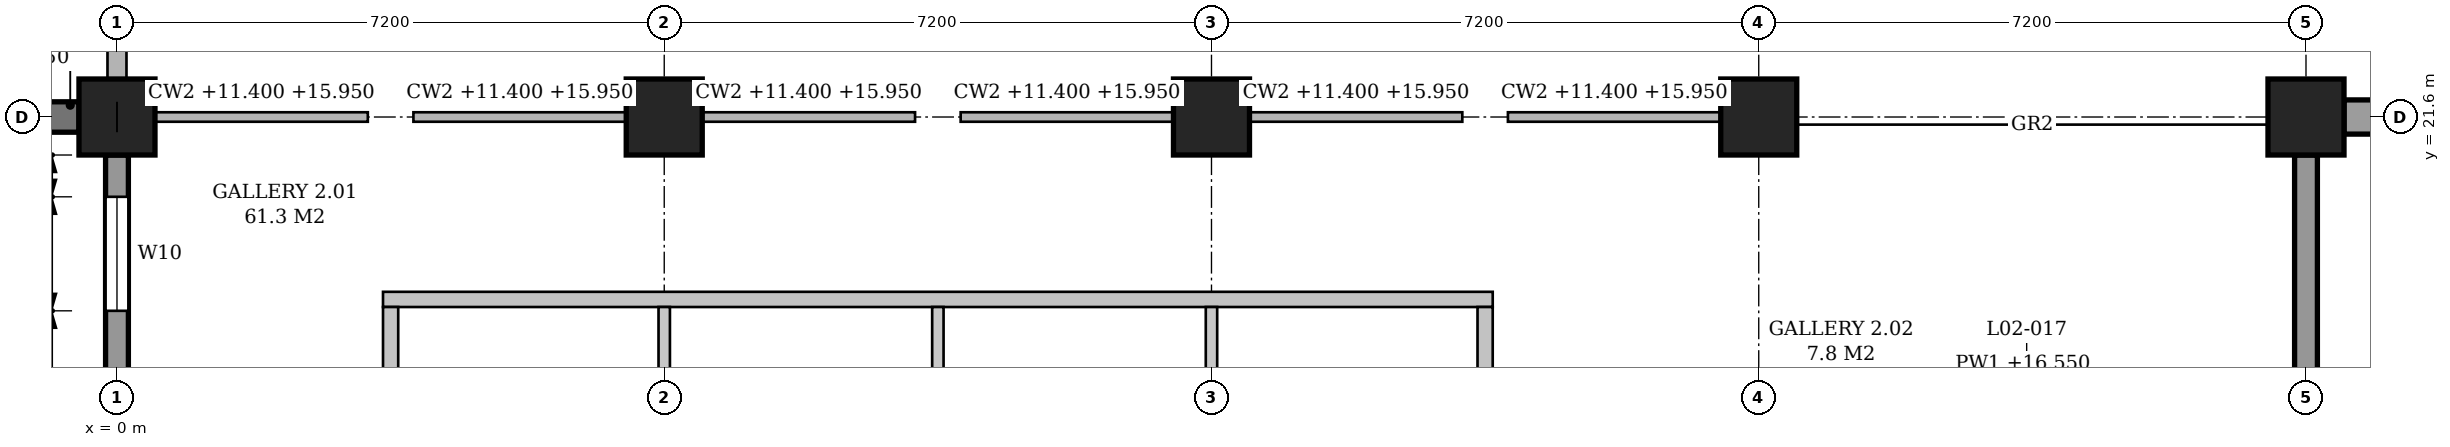
"""IFC4 building model, lengths in metres.
Left out: names, types, materials, properties, quantities, classifications, styles, units other than length and angle.
Written with IfcOpenShell. Run it as: python <this file> out.ifc"""

import sys

from ifc_helpers import new_model, si_unit, direction, frame, frame_2d, origin, origin_2d, place, context, subcontext, project, spatial, polyline, rectangle, outline, extrude, element, fill, save


model = new_model("IFC4")
c1 = context("Model", 3, precision=1e-05, world=origin(), true_north=direction((0.0, 1.0)))
c2 = subcontext(c1, "Body", "Model", "MODEL_VIEW")
j1 = project(units=[si_unit("LENGTHUNIT", "METRE"), si_unit("PLANEANGLEUNIT", "RADIAN")], contexts=[c1])
p1 = place(None, origin())
s1 = spatial("IfcSite", under=j1, at=p1, CompositionType="ELEMENT")
p2 = place(p1, origin())
s2 = spatial("IfcBuilding", under=s1, at=p2, CompositionType="ELEMENT")
p3 = place(p2, frame((0.0, 0.0, 11.4)))
s3 = spatial("IfcBuildingStorey", under=s2, at=p3, CompositionType="ELEMENT", Elevation=11.4)
for number, where, z_axis, x_axis in (
    (1, (0.0, 21.6, 0.0), (0.0, 0.0, 1.0), (1.0, 0.0, 0.0)),
    (2, (7.2, 21.6, 0.0), (0.0, 0.0, 1.0), (1.0, 0.0, 0.0)),
    (3, (14.4, 21.6, 0.0), (0.0, 0.0, 1.0), (1.0, 0.0, 0.0)),
    (4, (21.6, 21.6, 0.0), (0.0, 0.0, 1.0), (1.0, 0.0, 0.0)),
    (5, (28.8, 21.6, 0.0), (0.0, 0.0, 1.0), (1.0, 0.0, 0.0)),
):
    element("IfcColumn", number, at=place(p3, frame(where, z_axis=z_axis, x_axis=x_axis)), inside=s3, PredefinedType="COLUMN", context=c2, shape_type="SweptSolid", body=[
        extrude(rectangle(XDim=1.0, YDim=1.0, at=origin_2d()), origin(), (0.0, 0.0, 1.0), 5.4),
    ])
p4 = place(p3, frame((0.0, 14.9, 0.0), z_axis=(0.0, 0.0, 1.0), x_axis=(0.0, 1.0, 0.0)))
e6 = element("IfcWall", 6, at=p4, inside=s3, PredefinedType="STANDARD", context=c2, shape_type="SweptSolid", body=[
    extrude(rectangle(XDim=6.2, YDim=0.3, at=frame_2d((3.1, 0.0))), origin(), (0.0, 0.0, 1.0), 4.55),
])
p5 = place(p4, frame((0.55, 0.0, 0.9)))
e7 = element("IfcOpeningElement", 7, at=p5, cuts=e6, PredefinedType="OPENING", context=c2, shape_type="SweptSolid", body=[
    extrude(outline(polyline([(0.0, 0.0), (1.5, 0.0), (1.5, 2.35), (0.75, 3.1), (0.0, 2.35), (0.0, 0.0)])), frame((0.0, 0.16, 0.0), z_axis=(0.0, -1.0, 0.0), x_axis=(1.0, 0.0, 0.0)), (0.0, 0.0, 1.0), 0.32),
])
p6 = place(p4, frame((4.15, 0.0, 0.9)))
e8 = element("IfcOpeningElement", 8, at=p6, cuts=e6, PredefinedType="OPENING", context=c2, shape_type="SweptSolid", body=[
    extrude(outline(polyline([(0.0, 0.0), (1.5, 0.0), (1.5, 2.35), (0.75, 3.1), (0.0, 2.35), (0.0, 0.0)])), frame((0.0, 0.16, 0.0), z_axis=(0.0, -1.0, 0.0), x_axis=(1.0, 0.0, 0.0)), (0.0, 0.0, 1.0), 0.32),
])
p7 = place(p3, frame((28.8, 14.9, 0.0), z_axis=(0.0, 0.0, 1.0), x_axis=(0.0, 1.0, 0.0)))
e9 = element("IfcWall", 9, at=p7, inside=s3, PredefinedType="STANDARD", context=c2, shape_type="SweptSolid", body=[
    extrude(rectangle(XDim=6.2, YDim=0.3, at=frame_2d((3.1, 0.0))), origin(), (0.0, 0.0, 1.0), 4.55),
])
p8 = place(p3, frame((29.3, 21.6, 0.0), z_axis=(0.0, 0.0, 1.0), x_axis=(1.0, 0.0, 0.0)))
e10 = element("IfcWall", 10, at=p8, inside=s3, PredefinedType="STANDARD", context=c2, shape_type="SweptSolid", body=[
    extrude(rectangle(XDim=6.275, YDim=0.45, at=frame_2d((3.137, 0.0))), origin(), (0.0, 0.0, 1.0), 4.1),
])
p9 = place(p3, frame((-0.5, 21.6, 0.0), z_axis=(0.0, 0.0, 1.0), x_axis=(-1.0, 0.0, 0.0)))
e11 = element("IfcWall", 11, at=p9, inside=s3, PredefinedType="POLYGONAL", context=c2, shape_type="SweptSolid", body=[
    extrude(outline(polyline([(0.6, 0.0), (0.6, 9.95), (0.0, 9.95), (0.0, 0.0), (0.6, 0.0)])), frame((0.0, 0.2, 0.0), z_axis=(0.0, -1.0, 0.0), x_axis=(1.0, 0.0, 0.0)), (0.0, 0.0, 1.0), 0.4),
])
p10 = place(p3, frame((3.5, 19.2, 0.0), z_axis=(0.0, 0.0, 1.0), x_axis=(1.0, 0.0, 0.0)))
e12 = element("IfcWall", 12, at=p10, inside=s3, PredefinedType="PARTITIONING", context=c2, shape_type="SweptSolid", body=[
    extrude(outline(polyline([(0.0, 0.0), (14.6, 0.0), (14.6, 5.15), (11.15, 5.15), (11.15, 4.4), (10.65, 4.4), (10.65, 5.15), (3.95, 5.15), (3.95, 4.4), (3.45, 4.4), (3.45, 5.15), (0.0, 5.15), (0.0, 0.0)])), frame((0.0, 0.1, 0.0), z_axis=(0.0, -1.0, 0.0), x_axis=(1.0, 0.0, 0.0)), (0.0, 0.0, 1.0), 0.2),
])
p11 = place(p3, frame((3.6, 9.7, 0.0), z_axis=(0.0, 0.0, 1.0), x_axis=(0.0, 1.0, 0.0)))
e13 = element("IfcWall", 13, at=p11, inside=s3, PredefinedType="PARTITIONING", context=c2, shape_type="SweptSolid", body=[
    extrude(outline(polyline([(0.0, 0.0), (9.4, 0.0), (9.4, 5.15), (4.95, 5.15), (4.95, 4.4), (4.45, 4.4), (4.45, 5.15), (0.0, 5.15), (0.0, 0.0)])), frame((0.0, 0.1, 0.0), z_axis=(0.0, -1.0, 0.0), x_axis=(1.0, 0.0, 0.0)), (0.0, 0.0, 1.0), 0.2),
])
p12 = place(p11, frame((4.2, 0.0, 0.0)))
e14 = element("IfcOpeningElement", 14, at=p12, cuts=e13, PredefinedType="OPENING", context=c2, shape_type="SweptSolid", body=[
    extrude(rectangle(XDim=1.0, YDim=2.1, at=frame_2d((0.5, 1.05))), frame((0.0, 0.11, 0.0), z_axis=(0.0, -1.0, 0.0), x_axis=(1.0, 0.0, 0.0)), (0.0, 0.0, 1.0), 0.22),
])
p13 = place(p3, frame((7.2, 14.9, 0.0), z_axis=(0.0, 0.0, 1.0), x_axis=(0.0, 1.0, 0.0)))
e15 = element("IfcWall", 15, at=p13, inside=s3, PredefinedType="PARTITIONING", context=c2, shape_type="SweptSolid", body=[
    extrude(rectangle(XDim=4.2, YDim=0.15, at=frame_2d((2.1, 0.0))), origin(), (0.0, 0.0, 1.0), 4.4),
])
p14 = place(p3, frame((10.8, 9.7, 0.0), z_axis=(0.0, 0.0, 1.0), x_axis=(0.0, 1.0, 0.0)))
e16 = element("IfcWall", 16, at=p14, inside=s3, PredefinedType="PARTITIONING", context=c2, shape_type="SweptSolid", body=[
    extrude(rectangle(XDim=9.4, YDim=0.15, at=frame_2d((4.7, 0.0))), origin(), (0.0, 0.0, 1.0), 4.4),
])
p15 = place(p3, frame((14.4, 14.9, 0.0), z_axis=(0.0, 0.0, 1.0), x_axis=(0.0, 1.0, 0.0)))
e17 = element("IfcWall", 17, at=p15, inside=s3, PredefinedType="PARTITIONING", context=c2, shape_type="SweptSolid", body=[
    extrude(rectangle(XDim=4.2, YDim=0.15, at=frame_2d((2.1, 0.0))), origin(), (0.0, 0.0, 1.0), 4.4),
])
p16 = place(p3, frame((18.0, 9.7, 0.0), z_axis=(0.0, 0.0, 1.0), x_axis=(0.0, 1.0, 0.0)))
e18 = element("IfcWall", 18, at=p16, inside=s3, PredefinedType="PARTITIONING", context=c2, shape_type="SweptSolid", body=[
    extrude(outline(polyline([(0.0, 0.0), (9.4, 0.0), (9.4, 5.15), (4.95, 5.15), (4.95, 4.4), (4.45, 4.4), (4.45, 5.15), (0.0, 5.15), (0.0, 0.0)])), frame((0.0, 0.1, 0.0), z_axis=(0.0, -1.0, 0.0), x_axis=(1.0, 0.0, 0.0)), (0.0, 0.0, 1.0), 0.2),
])
p17 = place(p16, frame((4.2, 0.0, 0.0)))
e19 = element("IfcOpeningElement", 19, at=p17, cuts=e18, PredefinedType="OPENING", context=c2, shape_type="SweptSolid", body=[
    extrude(rectangle(XDim=1.0, YDim=2.1, at=frame_2d((0.5, 1.05))), frame((0.0, 0.11, 0.0), z_axis=(0.0, -1.0, 0.0), x_axis=(1.0, 0.0, 0.0)), (0.0, 0.0, 1.0), 0.22),
])
p18 = place(p6, origin())
e20 = element("IfcWindow", 20, at=p18, inside=s3, PartitioningType="SINGLE_PANEL", PredefinedType="WINDOW", context=c2, shape_type="SweptSolid", body=[
    extrude(outline(polyline([(0.0, 0.0), (1.5, 0.0), (1.5, 2.35), (0.75, 3.1), (0.0, 2.35), (0.0, 0.0)])), frame((0.0, 0.03, 0.0), z_axis=(0.0, -1.0, 0.0), x_axis=(1.0, 0.0, 0.0)), (0.0, 0.0, 1.0), 0.06),
])
fill(e8, e20)
save(model, sys.argv[1])
